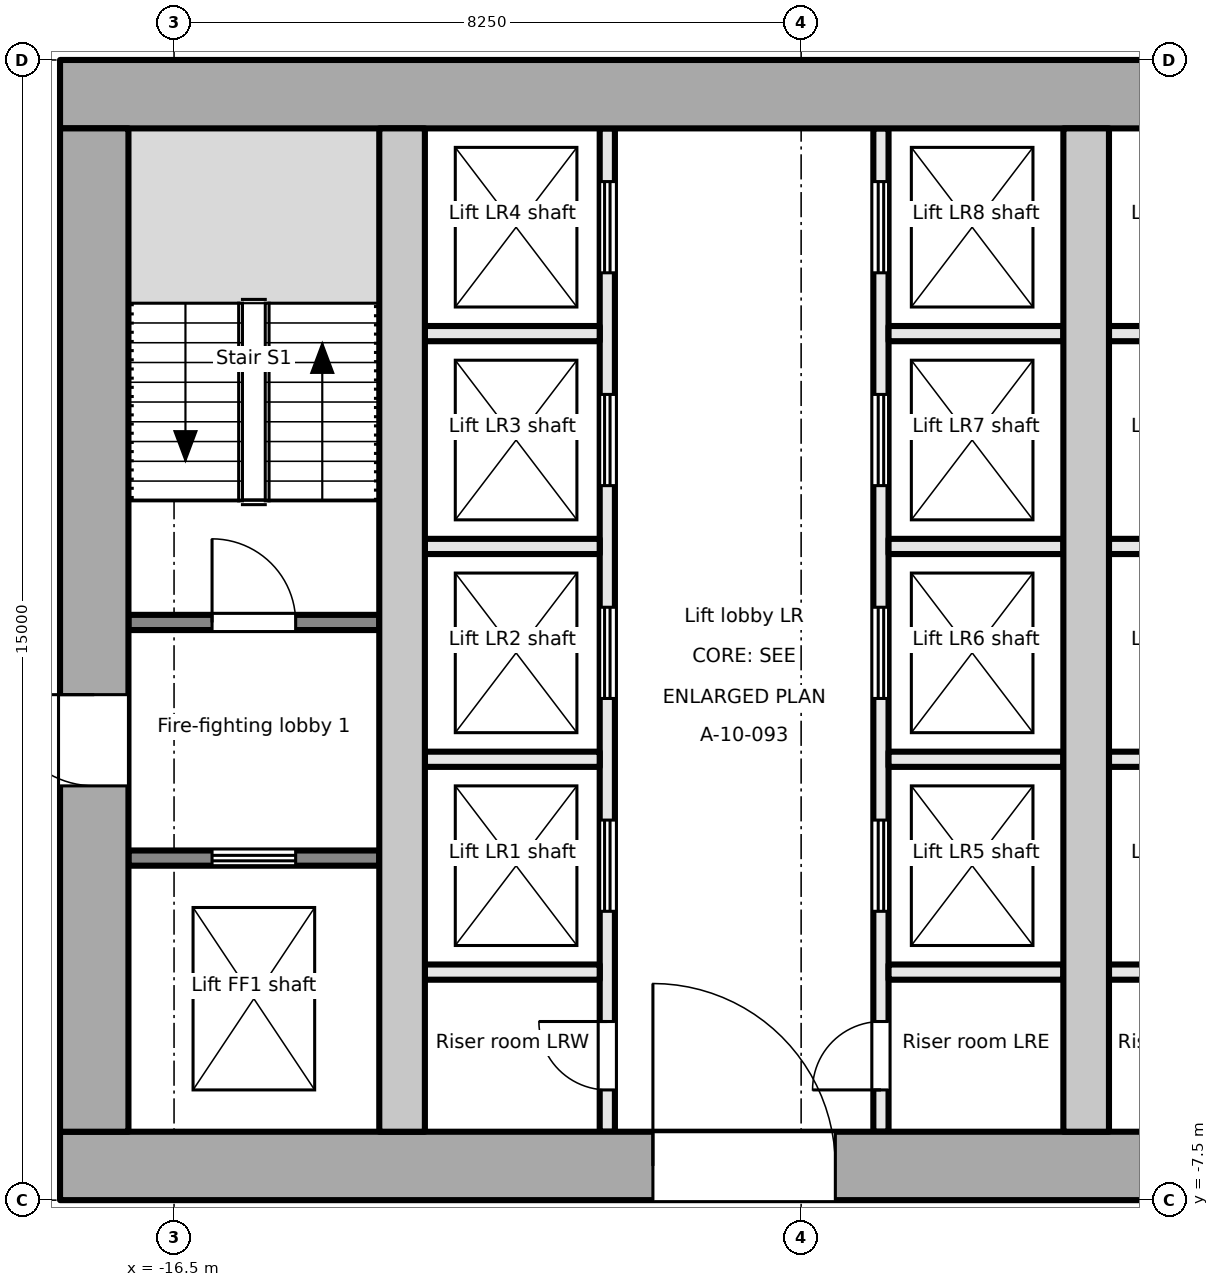
"""IFC4 building model, lengths in metres.
Left out: names, types, materials, properties, quantities, classifications, styles, units other than length and angle.
Written with IfcOpenShell. Run it as: python <this file> out.ifc"""

import sys

from ifc_helpers import new_model, si_unit, direction, frame, frame_2d, origin, place, context, subcontext, project, spatial, rectangle, extrude, element, fill, save


model = new_model("IFC4")
c1 = context("Model", 3, precision=1e-05, world=origin(), true_north=direction((0.0, 1.0)))
c2 = subcontext(c1, "Body", "Model", "MODEL_VIEW")
j1 = project(units=[si_unit("LENGTHUNIT", "METRE"), si_unit("PLANEANGLEUNIT", "RADIAN")], contexts=[c1])
p1 = place(None, origin())
s1 = spatial("IfcSite", under=j1, at=p1, CompositionType="ELEMENT")
p2 = place(p1, origin())
s2 = spatial("IfcBuilding", under=s1, at=p2, CompositionType="ELEMENT")
p3 = place(p2, frame((0.0, 0.0, 91.7)))
s3 = spatial("IfcBuildingStorey", under=s2, at=p3, CompositionType="ELEMENT", Elevation=91.7)
p4 = place(p3, frame((-18.0, -7.05, -0.2), z_axis=(0.0, 0.0, 1.0), x_axis=(1.0, 0.0, 0.0)))
e1 = element("IfcWall", 1, at=p4, inside=s3, PredefinedType="SHEAR", context=c2, shape_type="SweptSolid", body=[
    extrude(rectangle(XDim=36.0, YDim=0.9, at=frame_2d((18.0, 0.0))), origin(), (0.0, 0.0, 1.0), 4.0),
])
p5 = place(p4, frame((7.8, 0.0, 0.2)))
e2 = element("IfcOpeningElement", 2, at=p5, cuts=e1, PredefinedType="OPENING", context=c2, shape_type="SweptSolid", body=[
    extrude(rectangle(XDim=2.4, YDim=2.1, at=frame_2d((1.2, 1.05))), frame((0.0, 0.46, 0.0), z_axis=(0.0, -1.0, 0.0), x_axis=(1.0, 0.0, 0.0)), (0.0, 0.0, 1.0), 0.921),
])
p6 = place(p4, frame((17.4, 0.0, 0.2)))
e3 = element("IfcOpeningElement", 3, at=p6, cuts=e1, PredefinedType="OPENING", context=c2, shape_type="SweptSolid", body=[
    extrude(rectangle(XDim=1.2, YDim=2.1, at=frame_2d((0.6, 1.05))), frame((0.0, 0.46, 0.0), z_axis=(0.0, -1.0, 0.0), x_axis=(1.0, 0.0, 0.0)), (0.0, 0.0, 1.0), 0.921),
])
p7 = place(p4, frame((26.1, 0.0, 0.2)))
e4 = element("IfcOpeningElement", 4, at=p7, cuts=e1, PredefinedType="OPENING", context=c2, shape_type="SweptSolid", body=[
    extrude(rectangle(XDim=2.4, YDim=2.1, at=frame_2d((1.2, 1.05))), frame((0.0, 0.46, 0.0), z_axis=(0.0, -1.0, 0.0), x_axis=(1.0, 0.0, 0.0)), (0.0, 0.0, 1.0), 0.921),
])
p8 = place(p3, frame((-18.0, 7.05, -0.2), z_axis=(0.0, 0.0, 1.0), x_axis=(1.0, 0.0, 0.0)))
e5 = element("IfcWall", 5, at=p8, inside=s3, PredefinedType="SHEAR", context=c2, shape_type="SweptSolid", body=[
    extrude(rectangle(XDim=36.0, YDim=0.9, at=frame_2d((18.0, 0.0))), origin(), (0.0, 0.0, 1.0), 4.0),
])
p9 = place(p3, frame((-17.55, -6.6, -0.2), z_axis=(0.0, 0.0, 1.0), x_axis=(0.0, 1.0, 0.0)))
e6 = element("IfcWall", 6, at=p9, inside=s3, PredefinedType="SHEAR", context=c2, shape_type="SweptSolid", body=[
    extrude(rectangle(XDim=13.2, YDim=0.9, at=frame_2d((6.6, 0.0))), origin(), (0.0, 0.0, 1.0), 4.0),
])
p10 = place(p9, frame((4.55, 0.0, 0.2)))
e7 = element("IfcOpeningElement", 7, at=p10, cuts=e6, PredefinedType="OPENING", context=c2, shape_type="SweptSolid", body=[
    extrude(rectangle(XDim=1.2, YDim=2.1, at=frame_2d((0.6, 1.05))), frame((0.0, 0.46, 0.0), z_axis=(0.0, -1.0, 0.0), x_axis=(1.0, 0.0, 0.0)), (0.0, 0.0, 1.0), 0.921),
])
for number, where, z_axis, x_axis in (
    (8, (-13.5, -6.6, -0.2), (0.0, 0.0, 1.0), (0.0, 1.0, 0.0)),
    (9, (-4.5, -6.6, -0.2), (0.0, 0.0, 1.0), (0.0, 1.0, 0.0)),
):
    element("IfcWall", number, at=place(p3, frame(where, z_axis=z_axis, x_axis=x_axis)), inside=s3, PredefinedType="SHEAR", context=c2, shape_type="SweptSolid", body=[
        extrude(rectangle(XDim=13.2, YDim=0.6, at=frame_2d((6.6, 0.0))), origin(), (0.0, 0.0, 1.0), 4.0),
    ])
p11 = place(p3, frame((-17.1, -3.0, 0.0), z_axis=(0.0, 0.0, 1.0), x_axis=(1.0, 0.0, 0.0)))
e10 = element("IfcWall", 10, at=p11, inside=s3, PredefinedType="PARTITIONING", context=c2, shape_type="SweptSolid", body=[
    extrude(rectangle(XDim=3.3, YDim=0.2, at=frame_2d((1.65, 0.0))), origin(), (0.0, 0.0, 1.0), 3.8),
])
p12 = place(p11, frame((1.1, 0.0, 0.0)))
e11 = element("IfcOpeningElement", 11, at=p12, cuts=e10, PredefinedType="OPENING", context=c2, shape_type="SweptSolid", body=[
    extrude(rectangle(XDim=1.1, YDim=2.1, at=frame_2d((0.55, 1.05))), frame((0.0, 0.111, 0.0), z_axis=(0.0, -1.0, 0.0), x_axis=(1.0, 0.0, 0.0)), (0.0, 0.0, 1.0), 0.221),
])
p13 = place(p3, frame((-17.1, 0.1, 0.0), z_axis=(0.0, 0.0, 1.0), x_axis=(1.0, 0.0, 0.0)))
e12 = element("IfcWall", 12, at=p13, inside=s3, PredefinedType="PARTITIONING", context=c2, shape_type="SweptSolid", body=[
    extrude(rectangle(XDim=3.3, YDim=0.2, at=frame_2d((1.65, 0.0))), origin(), (0.0, 0.0, 1.0), 3.8),
])
p14 = place(p13, frame((1.1, 0.0, 0.0)))
e13 = element("IfcOpeningElement", 13, at=p14, cuts=e12, PredefinedType="OPENING", context=c2, shape_type="SweptSolid", body=[
    extrude(rectangle(XDim=1.1, YDim=2.1, at=frame_2d((0.55, 1.05))), frame((0.0, 0.111, 0.0), z_axis=(0.0, -1.0, 0.0), x_axis=(1.0, 0.0, 0.0)), (0.0, 0.0, 1.0), 0.221),
])
p15 = place(p3, frame((-10.8, -6.6, 0.0), z_axis=(0.0, 0.0, 1.0), x_axis=(0.0, 1.0, 0.0)))
e14 = element("IfcWall", 14, at=p15, inside=s3, PredefinedType="PARTITIONING", context=c2, shape_type="SweptSolid", body=[
    extrude(rectangle(XDim=13.2, YDim=0.2, at=frame_2d((6.6, 0.0))), origin(), (0.0, 0.0, 1.0), 3.8),
])
p16 = place(p15, frame((0.55, 0.0, 0.0)))
e15 = element("IfcOpeningElement", 15, at=p16, cuts=e14, PredefinedType="OPENING", context=c2, shape_type="SweptSolid", body=[
    extrude(rectangle(XDim=0.9, YDim=2.1, at=frame_2d((0.45, 1.05))), frame((0.0, 0.111, 0.0), z_axis=(0.0, -1.0, 0.0), x_axis=(1.0, 0.0, 0.0)), (0.0, 0.0, 1.0), 0.221),
])
p17 = place(p15, frame((2.9, 0.0, 0.0)))
e16 = element("IfcOpeningElement", 16, at=p17, cuts=e14, PredefinedType="OPENING", context=c2, shape_type="SweptSolid", body=[
    extrude(rectangle(XDim=1.2, YDim=2.1, at=frame_2d((0.6, 1.05))), frame((0.0, 0.111, 0.0), z_axis=(0.0, -1.0, 0.0), x_axis=(1.0, 0.0, 0.0)), (0.0, 0.0, 1.0), 0.221),
])
p18 = place(p15, frame((5.7, 0.0, 0.0)))
e17 = element("IfcOpeningElement", 17, at=p18, cuts=e14, PredefinedType="OPENING", context=c2, shape_type="SweptSolid", body=[
    extrude(rectangle(XDim=1.2, YDim=2.1, at=frame_2d((0.6, 1.05))), frame((0.0, 0.111, 0.0), z_axis=(0.0, -1.0, 0.0), x_axis=(1.0, 0.0, 0.0)), (0.0, 0.0, 1.0), 0.221),
])
p19 = place(p15, frame((8.5, 0.0, 0.0)))
e18 = element("IfcOpeningElement", 18, at=p19, cuts=e14, PredefinedType="OPENING", context=c2, shape_type="SweptSolid", body=[
    extrude(rectangle(XDim=1.2, YDim=2.1, at=frame_2d((0.6, 1.05))), frame((0.0, 0.111, 0.0), z_axis=(0.0, -1.0, 0.0), x_axis=(1.0, 0.0, 0.0)), (0.0, 0.0, 1.0), 0.221),
])
p20 = place(p15, frame((11.3, 0.0, 0.0)))
e19 = element("IfcOpeningElement", 19, at=p20, cuts=e14, PredefinedType="OPENING", context=c2, shape_type="SweptSolid", body=[
    extrude(rectangle(XDim=1.2, YDim=2.1, at=frame_2d((0.6, 1.05))), frame((0.0, 0.111, 0.0), z_axis=(0.0, -1.0, 0.0), x_axis=(1.0, 0.0, 0.0)), (0.0, 0.0, 1.0), 0.221),
])
p21 = place(p3, frame((-7.2, -6.6, 0.0), z_axis=(0.0, 0.0, 1.0), x_axis=(0.0, 1.0, 0.0)))
e20 = element("IfcWall", 20, at=p21, inside=s3, PredefinedType="PARTITIONING", context=c2, shape_type="SweptSolid", body=[
    extrude(rectangle(XDim=13.2, YDim=0.2, at=frame_2d((6.6, 0.0))), origin(), (0.0, 0.0, 1.0), 3.8),
])
p22 = place(p21, frame((0.55, 0.0, 0.0)))
e21 = element("IfcOpeningElement", 21, at=p22, cuts=e20, PredefinedType="OPENING", context=c2, shape_type="SweptSolid", body=[
    extrude(rectangle(XDim=0.9, YDim=2.1, at=frame_2d((0.45, 1.05))), frame((0.0, 0.111, 0.0), z_axis=(0.0, -1.0, 0.0), x_axis=(1.0, 0.0, 0.0)), (0.0, 0.0, 1.0), 0.221),
])
p23 = place(p21, frame((2.9, 0.0, 0.0)))
e22 = element("IfcOpeningElement", 22, at=p23, cuts=e20, PredefinedType="OPENING", context=c2, shape_type="SweptSolid", body=[
    extrude(rectangle(XDim=1.2, YDim=2.1, at=frame_2d((0.6, 1.05))), frame((0.0, 0.111, 0.0), z_axis=(0.0, -1.0, 0.0), x_axis=(1.0, 0.0, 0.0)), (0.0, 0.0, 1.0), 0.221),
])
p24 = place(p21, frame((5.7, 0.0, 0.0)))
e23 = element("IfcOpeningElement", 23, at=p24, cuts=e20, PredefinedType="OPENING", context=c2, shape_type="SweptSolid", body=[
    extrude(rectangle(XDim=1.2, YDim=2.1, at=frame_2d((0.6, 1.05))), frame((0.0, 0.111, 0.0), z_axis=(0.0, -1.0, 0.0), x_axis=(1.0, 0.0, 0.0)), (0.0, 0.0, 1.0), 0.221),
])
p25 = place(p21, frame((8.5, 0.0, 0.0)))
e24 = element("IfcOpeningElement", 24, at=p25, cuts=e20, PredefinedType="OPENING", context=c2, shape_type="SweptSolid", body=[
    extrude(rectangle(XDim=1.2, YDim=2.1, at=frame_2d((0.6, 1.05))), frame((0.0, 0.111, 0.0), z_axis=(0.0, -1.0, 0.0), x_axis=(1.0, 0.0, 0.0)), (0.0, 0.0, 1.0), 0.221),
])
p26 = place(p21, frame((11.3, 0.0, 0.0)))
e25 = element("IfcOpeningElement", 25, at=p26, cuts=e20, PredefinedType="OPENING", context=c2, shape_type="SweptSolid", body=[
    extrude(rectangle(XDim=1.2, YDim=2.1, at=frame_2d((0.6, 1.05))), frame((0.0, 0.111, 0.0), z_axis=(0.0, -1.0, 0.0), x_axis=(1.0, 0.0, 0.0)), (0.0, 0.0, 1.0), 0.221),
])
for number, where, z_axis, x_axis in (
    (26, (-13.2, -1.7, 0.0), (0.0, 0.0, 1.0), (1.0, 0.0, 0.0)),
    (27, (-13.2, 1.1, 0.0), (0.0, 0.0, 1.0), (1.0, 0.0, 0.0)),
    (28, (-13.2, 3.9, 0.0), (0.0, 0.0, 1.0), (1.0, 0.0, 0.0)),
    (29, (-13.2, -4.5, 0.0), (0.0, 0.0, 1.0), (1.0, 0.0, 0.0)),
    (30, (-7.1, -1.7, 0.0), (0.0, 0.0, 1.0), (1.0, 0.0, 0.0)),
    (31, (-7.1, 1.1, 0.0), (0.0, 0.0, 1.0), (1.0, 0.0, 0.0)),
    (32, (-7.1, 3.9, 0.0), (0.0, 0.0, 1.0), (1.0, 0.0, 0.0)),
    (33, (-7.1, -4.5, 0.0), (0.0, 0.0, 1.0), (1.0, 0.0, 0.0)),
    (34, (-4.2, -1.7, 0.0), (0.0, 0.0, 1.0), (1.0, 0.0, 0.0)),
    (35, (-4.2, 1.1, 0.0), (0.0, 0.0, 1.0), (1.0, 0.0, 0.0)),
    (36, (-4.2, 3.9, 0.0), (0.0, 0.0, 1.0), (1.0, 0.0, 0.0)),
    (37, (-4.2, -4.5, 0.0), (0.0, 0.0, 1.0), (1.0, 0.0, 0.0)),
):
    element("IfcWall", number, at=place(p3, frame(where, z_axis=z_axis, x_axis=x_axis)), inside=s3, PredefinedType="PARTITIONING", context=c2, shape_type="SweptSolid", body=[
        extrude(rectangle(XDim=2.3, YDim=0.2, at=frame_2d((1.15, 0.0))), origin(), (0.0, 0.0, 1.0), 3.8),
    ])
p27 = place(p12, origin())
e38 = element("IfcDoor", 38, at=p27, inside=s3, OperationType="DOUBLE_DOOR_SLIDING", PredefinedType="DOOR", context=c2, shape_type="SweptSolid", body=[
    extrude(rectangle(XDim=1.1, YDim=2.1, at=frame_2d((0.55, 1.05))), frame((0.0, 0.025, 0.0), z_axis=(0.0, -1.0, 0.0), x_axis=(1.0, 0.0, 0.0)), (0.0, 0.0, 1.0), 0.05),
])
fill(e11, e38)
p28 = place(p10, origin())
e39 = element("IfcDoor", 39, at=p28, inside=s3, OperationType="SINGLE_SWING_RIGHT", PredefinedType="DOOR", context=c2, shape_type="SweptSolid", body=[
    extrude(rectangle(XDim=1.2, YDim=2.1, at=frame_2d((0.6, 1.05))), frame((0.0, 0.025, 0.0), z_axis=(0.0, -1.0, 0.0), x_axis=(1.0, 0.0, 0.0)), (0.0, 0.0, 1.0), 0.05),
])
fill(e7, e39)
p29 = place(p14, origin())
e40 = element("IfcDoor", 40, at=p29, inside=s3, OperationType="SINGLE_SWING_LEFT", PredefinedType="DOOR", context=c2, shape_type="SweptSolid", body=[
    extrude(rectangle(XDim=1.1, YDim=2.1, at=frame_2d((0.55, 1.05))), frame((0.0, 0.025, 0.0), z_axis=(0.0, -1.0, 0.0), x_axis=(1.0, 0.0, 0.0)), (0.0, 0.0, 1.0), 0.05),
])
fill(e13, e40)
p30 = place(p16, origin())
e41 = element("IfcDoor", 41, at=p30, inside=s3, OperationType="SINGLE_SWING_RIGHT", PredefinedType="DOOR", context=c2, shape_type="SweptSolid", body=[
    extrude(rectangle(XDim=0.9, YDim=2.1, at=frame_2d((0.45, 1.05))), frame((0.0, 0.025, 0.0), z_axis=(0.0, -1.0, 0.0), x_axis=(1.0, 0.0, 0.0)), (0.0, 0.0, 1.0), 0.05),
])
fill(e15, e41)
p31 = place(p17, origin())
e42 = element("IfcDoor", 42, at=p31, inside=s3, OperationType="DOUBLE_DOOR_SLIDING", PredefinedType="DOOR", context=c2, shape_type="SweptSolid", body=[
    extrude(rectangle(XDim=1.2, YDim=2.1, at=frame_2d((0.6, 1.05))), frame((0.0, 0.025, 0.0), z_axis=(0.0, -1.0, 0.0), x_axis=(1.0, 0.0, 0.0)), (0.0, 0.0, 1.0), 0.05),
])
fill(e16, e42)
p32 = place(p18, origin())
e43 = element("IfcDoor", 43, at=p32, inside=s3, OperationType="DOUBLE_DOOR_SLIDING", PredefinedType="DOOR", context=c2, shape_type="SweptSolid", body=[
    extrude(rectangle(XDim=1.2, YDim=2.1, at=frame_2d((0.6, 1.05))), frame((0.0, 0.025, 0.0), z_axis=(0.0, -1.0, 0.0), x_axis=(1.0, 0.0, 0.0)), (0.0, 0.0, 1.0), 0.05),
])
fill(e17, e43)
p33 = place(p19, origin())
e44 = element("IfcDoor", 44, at=p33, inside=s3, OperationType="DOUBLE_DOOR_SLIDING", PredefinedType="DOOR", context=c2, shape_type="SweptSolid", body=[
    extrude(rectangle(XDim=1.2, YDim=2.1, at=frame_2d((0.6, 1.05))), frame((0.0, 0.025, 0.0), z_axis=(0.0, -1.0, 0.0), x_axis=(1.0, 0.0, 0.0)), (0.0, 0.0, 1.0), 0.05),
])
fill(e18, e44)
p34 = place(p20, origin())
e45 = element("IfcDoor", 45, at=p34, inside=s3, OperationType="DOUBLE_DOOR_SLIDING", PredefinedType="DOOR", context=c2, shape_type="SweptSolid", body=[
    extrude(rectangle(XDim=1.2, YDim=2.1, at=frame_2d((0.6, 1.05))), frame((0.0, 0.025, 0.0), z_axis=(0.0, -1.0, 0.0), x_axis=(1.0, 0.0, 0.0)), (0.0, 0.0, 1.0), 0.05),
])
fill(e19, e45)
p35 = place(p22, origin())
e46 = element("IfcDoor", 46, at=p35, inside=s3, OperationType="SINGLE_SWING_LEFT", PredefinedType="DOOR", context=c2, shape_type="SweptSolid", body=[
    extrude(rectangle(XDim=0.9, YDim=2.1, at=frame_2d((0.45, 1.05))), frame((0.0, 0.025, 0.0), z_axis=(0.0, -1.0, 0.0), x_axis=(1.0, 0.0, 0.0)), (0.0, 0.0, 1.0), 0.05),
])
fill(e21, e46)
p36 = place(p23, origin())
e47 = element("IfcDoor", 47, at=p36, inside=s3, OperationType="DOUBLE_DOOR_SLIDING", PredefinedType="DOOR", context=c2, shape_type="SweptSolid", body=[
    extrude(rectangle(XDim=1.2, YDim=2.1, at=frame_2d((0.6, 1.05))), frame((0.0, 0.025, 0.0), z_axis=(0.0, -1.0, 0.0), x_axis=(1.0, 0.0, 0.0)), (0.0, 0.0, 1.0), 0.05),
])
fill(e22, e47)
p37 = place(p24, origin())
e48 = element("IfcDoor", 48, at=p37, inside=s3, OperationType="DOUBLE_DOOR_SLIDING", PredefinedType="DOOR", context=c2, shape_type="SweptSolid", body=[
    extrude(rectangle(XDim=1.2, YDim=2.1, at=frame_2d((0.6, 1.05))), frame((0.0, 0.025, 0.0), z_axis=(0.0, -1.0, 0.0), x_axis=(1.0, 0.0, 0.0)), (0.0, 0.0, 1.0), 0.05),
])
fill(e23, e48)
p38 = place(p25, origin())
e49 = element("IfcDoor", 49, at=p38, inside=s3, OperationType="DOUBLE_DOOR_SLIDING", PredefinedType="DOOR", context=c2, shape_type="SweptSolid", body=[
    extrude(rectangle(XDim=1.2, YDim=2.1, at=frame_2d((0.6, 1.05))), frame((0.0, 0.025, 0.0), z_axis=(0.0, -1.0, 0.0), x_axis=(1.0, 0.0, 0.0)), (0.0, 0.0, 1.0), 0.05),
])
fill(e24, e49)
p39 = place(p26, origin())
e50 = element("IfcDoor", 50, at=p39, inside=s3, OperationType="DOUBLE_DOOR_SLIDING", PredefinedType="DOOR", context=c2, shape_type="SweptSolid", body=[
    extrude(rectangle(XDim=1.2, YDim=2.1, at=frame_2d((0.6, 1.05))), frame((0.0, 0.025, 0.0), z_axis=(0.0, -1.0, 0.0), x_axis=(1.0, 0.0, 0.0)), (0.0, 0.0, 1.0), 0.05),
])
fill(e25, e50)
p40 = place(p5, origin())
e51 = element("IfcDoor", 51, at=p40, inside=s3, OperationType="DOUBLE_DOOR_DOUBLE_SWING", PredefinedType="DOOR", context=c2, shape_type="SweptSolid", body=[
    extrude(rectangle(XDim=2.4, YDim=2.1, at=frame_2d((1.2, 1.05))), frame((0.0, 0.025, 0.0), z_axis=(0.0, -1.0, 0.0), x_axis=(1.0, 0.0, 0.0)), (0.0, 0.0, 1.0), 0.05),
])
fill(e2, e51)
save(model, sys.argv[1])
